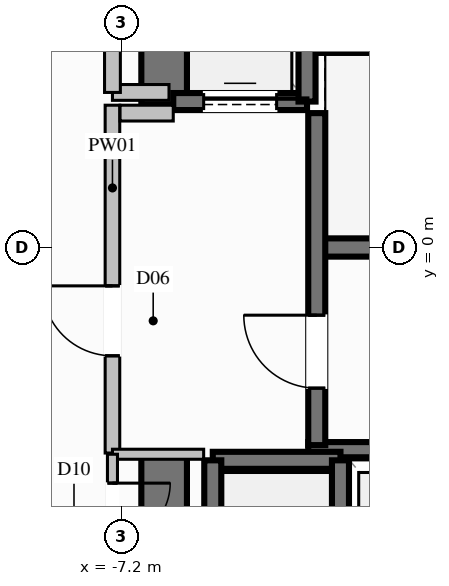
"""IFC4 building model, lengths in metres.
Left out: names, types, materials, properties, quantities, classifications, styles, units other than length and angle.
Written with IfcOpenShell. Run it as: python <this file> out.ifc"""

import sys

from ifc_helpers import new_model, si_unit, direction, frame, frame_2d, origin, place, context, subcontext, project, spatial, rectangle, extrude, element, fill, save


model = new_model("IFC4")
c1 = context("Model", 3, precision=1e-05, world=origin(), true_north=direction((0.0, 1.0)))
c2 = subcontext(c1, "Body", "Model", "MODEL_VIEW")
j1 = project(units=[si_unit("LENGTHUNIT", "METRE"), si_unit("PLANEANGLEUNIT", "RADIAN")], contexts=[c1])
p1 = place(None, origin())
s1 = spatial("IfcSite", under=j1, at=p1, CompositionType="ELEMENT")
p2 = place(p1, origin())
s2 = spatial("IfcBuilding", under=s1, at=p2, CompositionType="ELEMENT")
p3 = place(p2, frame((0.0, 0.0, 86.0)))
s3 = spatial("IfcBuildingStorey", under=s2, at=p3, CompositionType="ELEMENT", Elevation=86.0)
p4 = place(p3, frame((-3.99, 0.0, 0.0), z_axis=(0.0, 0.0, 1.0), x_axis=(1.0, 0.0, 0.0)))
e1 = element("IfcWall", 1, at=p4, inside=s3, PredefinedType="SHEAR", context=c2, shape_type="SweptSolid", body=[
    extrude(rectangle(XDim=7.98, YDim=0.3, at=frame_2d((3.99, 0.0))), origin(), (0.0, 0.0, 1.0), 3.6),
])
for number, where, z_axis, x_axis in (
    (2, (-4.13, -3.325, 0.0), (0.0, 0.0, 1.0), (1.0, 0.0, 0.0)),
    (3, (-4.13, 3.325, 0.0), (0.0, 0.0, 1.0), (1.0, 0.0, 0.0)),
):
    element("IfcWall", number, at=place(p3, frame(where, z_axis=z_axis, x_axis=x_axis)), inside=s3, PredefinedType="SOLIDWALL", context=c2, shape_type="SweptSolid", body=[
        extrude(rectangle(XDim=8.26, YDim=0.25, at=frame_2d((4.13, 0.0))), origin(), (0.0, 0.0, 1.0), 3.6),
    ])
p5 = place(p3, frame((-6.5, 2.35, 0.0), z_axis=(0.0, 0.0, 1.0), x_axis=(0.0, 1.0, 0.0)))
e4 = element("IfcWall", 4, at=p5, inside=s3, PredefinedType="SHEAR", context=c2, shape_type="SweptSolid", body=[
    extrude(rectangle(XDim=4.125, YDim=0.75, at=frame_2d((2.062, 0.0))), origin(), (0.0, 0.0, 1.0), 3.6),
])
p6 = place(p3, frame((-6.5, -6.475, 0.0), z_axis=(0.0, 0.0, 1.0), x_axis=(0.0, 1.0, 0.0)))
e5 = element("IfcWall", 5, at=p6, inside=s3, PredefinedType="SHEAR", context=c2, shape_type="SweptSolid", body=[
    extrude(rectangle(XDim=3.125, YDim=0.75, at=frame_2d((1.562, 0.0))), origin(), (0.0, 0.0, 1.0), 3.6),
])
p7 = place(p3, frame((-3.6, -3.5, 0.0), z_axis=(0.0, 0.0, 1.0), x_axis=(-1.0, 0.0, 0.0)))
e6 = element("IfcWall", 6, at=p7, inside=s3, PredefinedType="SOLIDWALL", context=c2, shape_type="SweptSolid", body=[
    extrude(rectangle(XDim=2.1, YDim=0.28, at=frame_2d((1.05, 0.0))), origin(), (0.0, 0.0, 1.0), 3.34),
])
for number, where, z_axis, x_axis in (
    (7, (-5.7, -3.5, 0.0), (0.0, 0.0, 1.0), (0.0, -1.0, 0.0)),
    (8, (-3.6, -6.0, 0.0), (0.0, 0.0, 1.0), (0.0, 1.0, 0.0)),
):
    element("IfcWall", number, at=place(p3, frame(where, z_axis=z_axis, x_axis=x_axis)), inside=s3, PredefinedType="SOLIDWALL", context=c2, shape_type="SweptSolid", body=[
        extrude(rectangle(XDim=2.5, YDim=0.28, at=frame_2d((1.25, 0.0))), origin(), (0.0, 0.0, 1.0), 3.34),
    ])
p8 = place(p3, frame((-6.35, 2.4, 0.0), z_axis=(0.0, 0.0, 1.0), x_axis=(1.0, 0.0, 0.0)))
e9 = element("IfcWall", 9, at=p8, inside=s3, PredefinedType="SOLIDWALL", context=c2, shape_type="SweptSolid", body=[
    extrude(rectangle(XDim=2.2, YDim=0.28, at=frame_2d((1.1, 0.0))), origin(), (0.0, 0.0, 1.0), 3.34),
])
p9 = place(p8, frame((0.5, 0.0, 0.0)))
e10 = element("IfcOpeningElement", 10, at=p9, cuts=e9, PredefinedType="OPENING", context=c2, shape_type="SweptSolid", body=[
    extrude(rectangle(XDim=1.2, YDim=2.2, at=frame_2d((0.6, 1.1))), frame((0.0, 0.15, 0.0), z_axis=(0.0, -1.0, 0.0), x_axis=(1.0, 0.0, 0.0)), (0.0, 0.0, 1.0), 0.3),
])
p10 = place(p3, frame((-4.15, 2.4, 0.0), z_axis=(0.0, 0.0, 1.0), x_axis=(0.0, 1.0, 0.0)))
e11 = element("IfcWall", 11, at=p10, inside=s3, PredefinedType="SOLIDWALL", context=c2, shape_type="SweptSolid", body=[
    extrude(rectangle(XDim=2.7, YDim=0.28, at=frame_2d((1.35, 0.0))), origin(), (0.0, 0.0, 1.0), 3.34),
])
p11 = place(p3, frame((-3.99, -3.25, 0.0), z_axis=(0.0, 0.0, 1.0), x_axis=(0.0, 1.0, 0.0)))
e12 = element("IfcWall", 12, at=p11, inside=s3, PredefinedType="SOLIDWALL", context=c2, shape_type="SweptSolid", body=[
    extrude(rectangle(XDim=5.46, YDim=0.28, at=frame_2d((2.73, 0.0))), origin(), (0.0, 0.0, 1.0), 3.34),
])
p12 = place(p11, frame((0.937, 0.0, 0.0)))
e13 = element("IfcOpeningElement", 13, at=p12, cuts=e12, PredefinedType="OPENING", context=c2, shape_type="SweptSolid", body=[
    extrude(rectangle(XDim=1.2, YDim=2.2, at=frame_2d((0.6, 1.1))), frame((0.0, 0.15, 0.0), z_axis=(0.0, -1.0, 0.0), x_axis=(1.0, 0.0, 0.0)), (0.0, 0.0, 1.0), 0.3),
])
p13 = place(p3, frame((-7.35, -3.38, 0.0), z_axis=(0.0, 0.0, 1.0), x_axis=(0.0, 1.0, 0.0)))
e14 = element("IfcWall", 14, at=p13, inside=s3, PredefinedType="PARTITIONING", context=c2, shape_type="SweptSolid", body=[
    extrude(rectangle(XDim=5.72, YDim=0.24, at=frame_2d((2.86, 0.0))), origin(), (0.0, 0.0, 1.0), 2.425),
])
p14 = place(p13, frame((1.599, 0.0, 0.0)))
e15 = element("IfcOpeningElement", 15, at=p14, cuts=e14, PredefinedType="OPENING", context=c2, shape_type="SweptSolid", body=[
    extrude(rectangle(XDim=1.15, YDim=2.2, at=frame_2d((0.575, 1.1))), frame((0.0, 0.13, 0.0), z_axis=(0.0, -1.0, 0.0), x_axis=(1.0, 0.0, 0.0)), (0.0, 0.0, 1.0), 0.26),
])
p15 = place(p3, frame((-7.225, 2.21, 0.0), z_axis=(0.0, 0.0, 1.0), x_axis=(1.0, 0.0, 0.0)))
e16 = element("IfcWall", 16, at=p15, inside=s3, PredefinedType="PARTITIONING", context=c2, shape_type="SweptSolid", body=[
    extrude(rectangle(XDim=0.875, YDim=0.26, at=frame_2d((0.438, 0.0))), origin(), (0.0, 0.0, 1.0), 3.34),
])
p16 = place(p3, frame((-7.35, 2.55, 0.0), z_axis=(0.0, 0.0, 1.0), x_axis=(1.0, 0.0, 0.0)))
e17 = element("IfcWall", 17, at=p16, inside=s3, PredefinedType="PARTITIONING", context=c2, shape_type="SweptSolid", body=[
    extrude(rectangle(XDim=0.93, YDim=0.26, at=frame_2d((0.465, 0.0))), origin(), (0.0, 0.0, 1.0), 3.34),
])
p17 = place(p3, frame((-7.35, 2.55, 0.0), z_axis=(0.0, 0.0, 1.0), x_axis=(0.0, 1.0, 0.0)))
e18 = element("IfcWall", 18, at=p17, inside=s3, PredefinedType="PARTITIONING", context=c2, shape_type="SweptSolid", body=[
    extrude(rectangle(XDim=2.4, YDim=0.26, at=frame_2d((1.2, 0.0))), origin(), (0.0, 0.0, 1.0), 2.425),
])
p18 = place(p17, frame((0.775, 0.0, 0.0)))
e19 = element("IfcOpeningElement", 19, at=p18, cuts=e18, PredefinedType="OPENING", context=c2, shape_type="SweptSolid", body=[
    extrude(rectangle(XDim=0.85, YDim=2.05, at=frame_2d((0.425, 1.025))), frame((0.0, 0.14, 0.0), z_axis=(0.0, -1.0, 0.0), x_axis=(1.0, 0.0, 0.0)), (0.0, 0.0, 1.0), 0.28),
])
p19 = place(p3, frame((-5.85, -3.4, 0.0), z_axis=(0.0, 0.0, 1.0), x_axis=(-1.0, 0.0, 0.0)))
e20 = element("IfcWall", 20, at=p19, inside=s3, PredefinedType="PARTITIONING", context=c2, shape_type="SweptSolid", body=[
    extrude(rectangle(XDim=1.5, YDim=0.165, at=frame_2d((0.75, 0.0))), origin(), (0.0, 0.0, 1.0), 3.34),
])
p20 = place(p3, frame((-7.35, -3.4, 0.0), z_axis=(0.0, 0.0, 1.0), x_axis=(0.0, -1.0, 0.0)))
e21 = element("IfcWall", 21, at=p20, inside=s3, PredefinedType="PARTITIONING", context=c2, shape_type="SweptSolid", body=[
    extrude(rectangle(XDim=1.9, YDim=0.165, at=frame_2d((0.95, 0.0))), origin(), (0.0, 0.0, 1.0), 3.34),
])
p21 = place(p20, frame((0.475, 0.0, 0.0)))
e22 = element("IfcOpeningElement", 22, at=p21, cuts=e21, PredefinedType="OPENING", context=c2, shape_type="SweptSolid", body=[
    extrude(rectangle(XDim=0.95, YDim=2.1, at=frame_2d((0.475, 1.05))), frame((0.0, 0.093, 0.0), z_axis=(0.0, -1.0, 0.0), x_axis=(1.0, 0.0, 0.0)), (0.0, 0.0, 1.0), 0.185),
])
p22 = place(p9, origin())
e23 = element("IfcDoor", 23, at=p22, inside=s3, OperationType="SLIDING_TO_LEFT", PredefinedType="DOOR", context=c2, shape_type="SweptSolid", body=[
    extrude(rectangle(XDim=1.2, YDim=2.2, at=frame_2d((0.6, 1.1))), frame((0.0, 0.025, 0.0), z_axis=(0.0, -1.0, 0.0), x_axis=(1.0, 0.0, 0.0)), (0.0, 0.0, 1.0), 0.05),
])
fill(e10, e23)
p23 = place(p12, origin())
e24 = element("IfcDoor", 24, at=p23, inside=s3, OperationType="SINGLE_SWING_RIGHT", PredefinedType="DOOR", context=c2, shape_type="SweptSolid", body=[
    extrude(rectangle(XDim=1.2, YDim=2.2, at=frame_2d((0.6, 1.1))), frame((0.0, 0.025, 0.0), z_axis=(0.0, -1.0, 0.0), x_axis=(1.0, 0.0, 0.0)), (0.0, 0.0, 1.0), 0.05),
])
fill(e13, e24)
p24 = place(p14, origin())
e25 = element("IfcDoor", 25, at=p24, inside=s3, OperationType="SINGLE_SWING_RIGHT", PredefinedType="DOOR", context=c2, shape_type="SweptSolid", body=[
    extrude(rectangle(XDim=1.15, YDim=2.2, at=frame_2d((0.575, 1.1))), frame((0.0, 0.025, 0.0), z_axis=(0.0, -1.0, 0.0), x_axis=(1.0, 0.0, 0.0)), (0.0, 0.0, 1.0), 0.05),
])
fill(e15, e25)
p25 = place(p21, origin())
e26 = element("IfcDoor", 26, at=p25, inside=s3, OperationType="SINGLE_SWING_LEFT", PredefinedType="DOOR", context=c2, shape_type="SweptSolid", body=[
    extrude(rectangle(XDim=0.95, YDim=2.1, at=frame_2d((0.475, 1.05))), frame((0.0, 0.025, 0.0), z_axis=(0.0, -1.0, 0.0), x_axis=(1.0, 0.0, 0.0)), (0.0, 0.0, 1.0), 0.05),
])
fill(e22, e26)
save(model, sys.argv[1])
